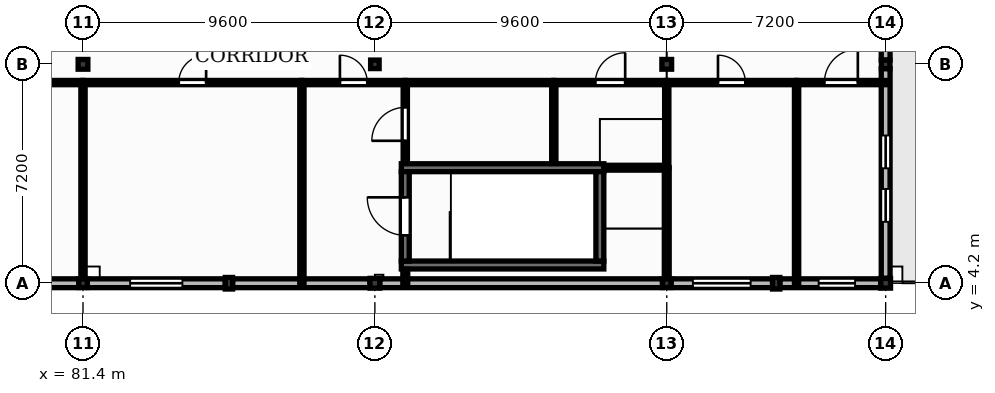
"""IFC4 building model, lengths in metres.
Left out: names, types, materials, properties, quantities, classifications, styles, units other than length and angle.
Written with IfcOpenShell. Run it as: python <this file> out.ifc"""

import sys

from ifc_helpers import new_model, si_unit, direction, frame, frame_2d, origin, origin_2d, place, context, subcontext, project, spatial, rectangle, extrude, element, fill, save


model = new_model("IFC4")
c1 = context("Model", 3, precision=1e-05, world=origin(), true_north=direction((0.0, 1.0)))
c2 = subcontext(c1, "Body", "Model", "MODEL_VIEW")
j1 = project(units=[si_unit("LENGTHUNIT", "METRE"), si_unit("PLANEANGLEUNIT", "RADIAN")], contexts=[c1])
p1 = place(None, origin())
s1 = spatial("IfcSite", under=j1, at=p1, CompositionType="ELEMENT")
p2 = place(p1, origin())
s2 = spatial("IfcBuilding", under=s1, at=p2, CompositionType="ELEMENT")
p3 = place(p2, frame((0.0, 0.0, 13.2)))
s3 = spatial("IfcBuildingStorey", under=s2, at=p3, CompositionType="ELEMENT", Elevation=13.2)
p4 = place(p3, frame((81.4, 4.2, 0.0), z_axis=(0.0, 0.0, 1.0), x_axis=(1.0, 0.0, 0.0)))
e1 = element("IfcColumn", 1, at=p4, inside=s3, PredefinedType="COLUMN", context=c2, shape_type="SweptSolid", body=[
    extrude(rectangle(XDim=0.28, YDim=0.28, at=origin_2d()), origin(), (0.0, 0.0, 1.0), 3.98),
])
p5 = place(p3, frame((81.4, 11.4, 0.0), z_axis=(0.0, 0.0, 1.0), x_axis=(1.0, 0.0, 0.0)))
e2 = element("IfcColumn", 2, at=p5, inside=s3, PredefinedType="COLUMN", context=c2, shape_type="SweptSolid", body=[
    extrude(rectangle(XDim=0.32, YDim=0.32, at=origin_2d()), origin(), (0.0, 0.0, 1.0), 6.045),
])
p6 = place(p3, frame((91.0, 4.2, 0.0), z_axis=(0.0, 0.0, 1.0), x_axis=(1.0, 0.0, 0.0)))
e3 = element("IfcColumn", 3, at=p6, inside=s3, PredefinedType="COLUMN", context=c2, shape_type="SweptSolid", body=[
    extrude(rectangle(XDim=0.32, YDim=0.32, at=origin_2d()), origin(), (0.0, 0.0, 1.0), 3.98),
])
p7 = place(p3, frame((91.0, 11.4, 0.0), z_axis=(0.0, 0.0, 1.0), x_axis=(1.0, 0.0, 0.0)))
e4 = element("IfcColumn", 4, at=p7, inside=s3, PredefinedType="COLUMN", context=c2, shape_type="SweptSolid", body=[
    extrude(rectangle(XDim=0.28, YDim=0.28, at=origin_2d()), origin(), (0.0, 0.0, 1.0), 6.045),
])
p8 = place(p3, frame((100.6, 4.2, 0.0), z_axis=(0.0, 0.0, 1.0), x_axis=(1.0, 0.0, 0.0)))
e5 = element("IfcColumn", 5, at=p8, inside=s3, PredefinedType="COLUMN", context=c2, shape_type="SweptSolid", body=[
    extrude(rectangle(XDim=0.28, YDim=0.28, at=origin_2d()), origin(), (0.0, 0.0, 1.0), 3.98),
])
p9 = place(p3, frame((100.6, 11.4, 0.0), z_axis=(0.0, 0.0, 1.0), x_axis=(1.0, 0.0, 0.0)))
e6 = element("IfcColumn", 6, at=p9, inside=s3, PredefinedType="COLUMN", context=c2, shape_type="SweptSolid", body=[
    extrude(rectangle(XDim=0.32, YDim=0.32, at=origin_2d()), origin(), (0.0, 0.0, 1.0), 6.045),
])
p10 = place(p3, frame((107.8, 4.2, 0.0), z_axis=(0.0, 0.0, 1.0), x_axis=(1.0, 0.0, 0.0)))
e7 = element("IfcColumn", 7, at=p10, inside=s3, PredefinedType="COLUMN", context=c2, shape_type="SweptSolid", body=[
    extrude(rectangle(XDim=0.32, YDim=0.32, at=origin_2d()), origin(), (0.0, 0.0, 1.0), 3.98),
])
p11 = place(p3, frame((107.8, 11.4, 0.0), z_axis=(0.0, 0.0, 1.0), x_axis=(1.0, 0.0, 0.0)))
e8 = element("IfcColumn", 8, at=p11, inside=s3, PredefinedType="COLUMN", context=c2, shape_type="SweptSolid", body=[
    extrude(rectangle(XDim=0.28, YDim=0.28, at=origin_2d()), origin(), (0.0, 0.0, 1.0), 6.045),
])
for number, where, z_axis, x_axis in (
    (9, (86.2, 4.2, 0.0), (0.0, 0.0, 1.0), (1.0, 0.0, 0.0)),
    (10, (104.2, 4.2, 0.0), (0.0, 0.0, 1.0), (1.0, 0.0, 0.0)),
):
    element("IfcColumn", number, at=place(p3, frame(where, z_axis=z_axis, x_axis=x_axis)), inside=s3, PredefinedType="PILASTER", context=c2, shape_type="SweptSolid", body=[
        extrude(rectangle(XDim=0.24, YDim=0.38, at=origin_2d()), origin(), (0.0, 0.0, 1.0), 4.0),
    ])
p12 = place(p3, frame((72.76, 4.2, 0.0), z_axis=(0.0, 0.0, 1.0), x_axis=(1.0, 0.0, 0.0)))
e11 = element("IfcWall", 11, at=p12, inside=s3, PredefinedType="SOLIDWALL", context=c2, shape_type="SweptSolid", body=[
    extrude(rectangle(XDim=8.5, YDim=0.29, at=frame_2d((4.25, 0.0))), origin(), (0.0, 0.0, 1.0), 4.0),
])
p13 = place(p12, frame((1.812, 0.0, 1.0)))
e12 = element("IfcOpeningElement", 12, at=p13, cuts=e11, PredefinedType="OPENING", context=c2, shape_type="SweptSolid", body=[
    extrude(rectangle(XDim=1.48, YDim=2.2, at=frame_2d((0.74, 1.1))), frame((0.0, 0.155, 0.0), z_axis=(0.0, -1.0, 0.0), x_axis=(1.0, 0.0, 0.0)), (0.0, 0.0, 1.0), 0.31),
])
p14 = place(p12, frame((5.882, 0.0, 1.0)))
e13 = element("IfcOpeningElement", 13, at=p14, cuts=e11, PredefinedType="OPENING", context=c2, shape_type="SweptSolid", body=[
    extrude(rectangle(XDim=1.6, YDim=2.2, at=frame_2d((0.8, 1.1))), frame((0.0, 0.155, 0.0), z_axis=(0.0, -1.0, 0.0), x_axis=(1.0, 0.0, 0.0)), (0.0, 0.0, 1.0), 0.31),
])
p15 = place(p3, frame((81.54, 4.2, 0.0), z_axis=(0.0, 0.0, 1.0), x_axis=(1.0, 0.0, 0.0)))
e14 = element("IfcWall", 14, at=p15, inside=s3, PredefinedType="SOLIDWALL", context=c2, shape_type="SweptSolid", body=[
    extrude(rectangle(XDim=4.54, YDim=0.29, at=frame_2d((2.27, 0.0))), origin(), (0.0, 0.0, 1.0), 4.0),
])
p16 = place(p15, frame((1.41, 0.0, 1.0)))
e15 = element("IfcOpeningElement", 15, at=p16, cuts=e14, PredefinedType="OPENING", context=c2, shape_type="SweptSolid", body=[
    extrude(rectangle(XDim=1.72, YDim=2.2, at=frame_2d((0.86, 1.1))), frame((0.0, 0.155, 0.0), z_axis=(0.0, -1.0, 0.0), x_axis=(1.0, 0.0, 0.0)), (0.0, 0.0, 1.0), 0.31),
])
p17 = place(p3, frame((86.32, 4.2, 0.0), z_axis=(0.0, 0.0, 1.0), x_axis=(1.0, 0.0, 0.0)))
e16 = element("IfcWall", 16, at=p17, inside=s3, PredefinedType="SOLIDWALL", context=c2, shape_type="SweptSolid", body=[
    extrude(rectangle(XDim=4.52, YDim=0.29, at=frame_2d((2.26, 0.0))), origin(), (0.0, 0.0, 1.0), 4.0),
])
p18 = place(p3, frame((91.16, 4.2, 0.0), z_axis=(0.0, 0.0, 1.0), x_axis=(1.0, 0.0, 0.0)))
e17 = element("IfcWall", 17, at=p18, inside=s3, PredefinedType="SOLIDWALL", context=c2, shape_type="SweptSolid", body=[
    extrude(rectangle(XDim=9.3, YDim=0.29, at=frame_2d((4.65, 0.0))), origin(), (0.0, 0.0, 1.0), 4.0),
])
p19 = place(p3, frame((100.74, 4.2, 0.0), z_axis=(0.0, 0.0, 1.0), x_axis=(1.0, 0.0, 0.0)))
e18 = element("IfcWall", 18, at=p19, inside=s3, PredefinedType="SOLIDWALL", context=c2, shape_type="SweptSolid", body=[
    extrude(rectangle(XDim=3.34, YDim=0.29, at=frame_2d((1.67, 0.0))), origin(), (0.0, 0.0, 1.0), 4.0),
])
p20 = place(p19, frame((0.72, 0.0, 1.0)))
e19 = element("IfcOpeningElement", 19, at=p20, cuts=e18, PredefinedType="OPENING", context=c2, shape_type="SweptSolid", body=[
    extrude(rectangle(XDim=1.9, YDim=1.95, at=frame_2d((0.95, 0.975))), frame((0.0, 0.155, 0.0), z_axis=(0.0, -1.0, 0.0), x_axis=(1.0, 0.0, 0.0)), (0.0, 0.0, 1.0), 0.31),
])
p21 = place(p3, frame((104.32, 4.2, 0.0), z_axis=(0.0, 0.0, 1.0), x_axis=(1.0, 0.0, 0.0)))
e20 = element("IfcWall", 20, at=p21, inside=s3, PredefinedType="SOLIDWALL", context=c2, shape_type="SweptSolid", body=[
    extrude(rectangle(XDim=3.32, YDim=0.29, at=frame_2d((1.66, 0.0))), origin(), (0.0, 0.0, 1.0), 4.0),
])
p22 = place(p21, frame((1.275, 0.0, 1.0)))
e21 = element("IfcOpeningElement", 21, at=p22, cuts=e20, PredefinedType="OPENING", context=c2, shape_type="SweptSolid", body=[
    extrude(rectangle(XDim=1.2, YDim=1.95, at=frame_2d((0.6, 0.975))), frame((0.0, 0.155, 0.0), z_axis=(0.0, -1.0, 0.0), x_axis=(1.0, 0.0, 0.0)), (0.0, 0.0, 1.0), 0.31),
])
p23 = place(p3, frame((107.8, 4.36, 0.0), z_axis=(0.0, 0.0, 1.0), x_axis=(0.0, 1.0, 0.0)))
e22 = element("IfcWall", 22, at=p23, inside=s3, PredefinedType="SOLIDWALL", context=c2, shape_type="SweptSolid", body=[
    extrude(rectangle(XDim=6.9, YDim=0.29, at=frame_2d((3.45, 0.0))), origin(), (0.0, 0.0, 1.0), 4.0),
])
p24 = place(p23, frame((1.86, 0.0, 1.0)))
e23 = element("IfcOpeningElement", 23, at=p24, cuts=e22, PredefinedType="OPENING", context=c2, shape_type="SweptSolid", body=[
    extrude(rectangle(XDim=1.08, YDim=1.95, at=frame_2d((0.54, 0.975))), frame((0.0, 0.155, 0.0), z_axis=(0.0, -1.0, 0.0), x_axis=(1.0, 0.0, 0.0)), (0.0, 0.0, 1.0), 0.31),
])
p25 = place(p23, frame((3.62, 0.0, 1.0)))
e24 = element("IfcOpeningElement", 24, at=p25, cuts=e22, PredefinedType="OPENING", context=c2, shape_type="SweptSolid", body=[
    extrude(rectangle(XDim=1.08, YDim=1.95, at=frame_2d((0.54, 0.975))), frame((0.0, 0.155, 0.0), z_axis=(0.0, -1.0, 0.0), x_axis=(1.0, 0.0, 0.0)), (0.0, 0.0, 1.0), 0.31),
])
p26 = place(p3, frame((107.8, 11.54, 0.0), z_axis=(0.0, 0.0, 1.0), x_axis=(0.0, 1.0, 0.0)))
e25 = element("IfcWall", 25, at=p26, inside=s3, PredefinedType="SOLIDWALL", context=c2, shape_type="SweptSolid", body=[
    extrude(rectangle(XDim=6.9, YDim=0.29, at=frame_2d((3.45, 0.0))), origin(), (0.0, 0.0, 1.0), 4.0),
])
p27 = place(p26, frame((2.9, 0.0, 0.0)))
e26 = element("IfcOpeningElement", 26, at=p27, cuts=e25, PredefinedType="OPENING", context=c2, shape_type="SweptSolid", body=[
    extrude(rectangle(XDim=1.1, YDim=2.25, at=frame_2d((0.55, 1.125))), frame((0.0, 0.155, 0.0), z_axis=(0.0, -1.0, 0.0), x_axis=(1.0, 0.0, 0.0)), (0.0, 0.0, 1.0), 0.31),
])
p28 = place(p26, frame((4.82, 0.0, 1.0)))
e27 = element("IfcOpeningElement", 27, at=p28, cuts=e25, PredefinedType="OPENING", context=c2, shape_type="SweptSolid", body=[
    extrude(rectangle(XDim=1.2, YDim=1.95, at=frame_2d((0.6, 0.975))), frame((0.0, 0.155, 0.0), z_axis=(0.0, -1.0, 0.0), x_axis=(1.0, 0.0, 0.0)), (0.0, 0.0, 1.0), 0.31),
])
for number, where, z_axis, x_axis in (
    (28, (91.87, 4.8, 0.0), (0.0, 0.0, 1.0), (1.0, 0.0, 0.0)),
    (29, (91.87, 8.0, 0.0), (0.0, 0.0, 1.0), (1.0, 0.0, 0.0)),
):
    element("IfcWall", number, at=place(p3, frame(where, z_axis=z_axis, x_axis=x_axis)), inside=s3, PredefinedType="SHEAR", context=c2, shape_type="SweptSolid", body=[
        extrude(rectangle(XDim=6.66, YDim=0.26, at=frame_2d((3.33, 0.0))), origin(), (0.0, 0.0, 1.0), 3.85),
    ])
p29 = place(p3, frame((92.0, 4.93, 0.0), z_axis=(0.0, 0.0, 1.0), x_axis=(0.0, 1.0, 0.0)))
e30 = element("IfcWall", 30, at=p29, inside=s3, PredefinedType="SHEAR", context=c2, shape_type="SweptSolid", body=[
    extrude(rectangle(XDim=2.94, YDim=0.26, at=frame_2d((1.47, 0.0))), origin(), (0.0, 0.0, 1.0), 3.85),
])
p30 = place(p29, frame((0.845, 0.0, 0.0)))
e31 = element("IfcOpeningElement", 31, at=p30, cuts=e30, PredefinedType="OPENING", context=c2, shape_type="SweptSolid", body=[
    extrude(rectangle(XDim=1.25, YDim=2.15, at=frame_2d((0.625, 1.075))), frame((0.0, 0.14, 0.0), z_axis=(0.0, -1.0, 0.0), x_axis=(1.0, 0.0, 0.0)), (0.0, 0.0, 1.0), 0.28),
])
p31 = place(p3, frame((98.4, 4.93, 0.0), z_axis=(0.0, 0.0, 1.0), x_axis=(0.0, 1.0, 0.0)))
e32 = element("IfcWall", 32, at=p31, inside=s3, PredefinedType="SHEAR", context=c2, shape_type="SweptSolid", body=[
    extrude(rectangle(XDim=2.94, YDim=0.26, at=frame_2d((1.47, 0.0))), origin(), (0.0, 0.0, 1.0), 3.85),
])
p32 = place(p3, frame((77.744, 10.8, 0.0), z_axis=(0.0, 0.0, 1.0), x_axis=(1.0, 0.0, 0.0)))
e33 = element("IfcWall", 33, at=p32, inside=s3, PredefinedType="PARTITIONING", context=c2, shape_type="SweptSolid", body=[
    extrude(rectangle(XDim=3.656, YDim=0.14, at=frame_2d((1.828, 0.0))), origin(), (0.0, 0.0, 1.0), 3.75),
])
p33 = place(p32, frame((1.378, 0.0, 0.0)))
e34 = element("IfcOpeningElement", 34, at=p33, cuts=e33, PredefinedType="OPENING", context=c2, shape_type="SweptSolid", body=[
    extrude(rectangle(XDim=0.9, YDim=2.1, at=frame_2d((0.45, 1.05))), frame((0.0, 0.08, 0.0), z_axis=(0.0, -1.0, 0.0), x_axis=(1.0, 0.0, 0.0)), (0.0, 0.0, 1.0), 0.16),
])
p34 = place(p3, frame((81.4, 4.34, 0.0), z_axis=(0.0, 0.0, 1.0), x_axis=(0.0, 1.0, 0.0)))
e35 = element("IfcWall", 35, at=p34, inside=s3, PredefinedType="PARTITIONING", context=c2, shape_type="SweptSolid", body=[
    extrude(rectangle(XDim=6.39, YDim=0.14, at=frame_2d((3.195, 0.0))), origin(), (0.0, 0.0, 1.0), 3.75),
])
p35 = place(p3, frame((81.4, 10.8, 0.0), z_axis=(0.0, 0.0, 1.0), x_axis=(1.0, 0.0, 0.0)))
e36 = element("IfcWall", 36, at=p35, inside=s3, PredefinedType="PARTITIONING", context=c2, shape_type="SweptSolid", body=[
    extrude(rectangle(XDim=7.2, YDim=0.14, at=frame_2d((3.6, 0.0))), origin(), (0.0, 0.0, 1.0), 3.75),
])
p36 = place(p35, frame((3.15, 0.0, 0.0)))
e37 = element("IfcOpeningElement", 37, at=p36, cuts=e36, PredefinedType="OPENING", context=c2, shape_type="SweptSolid", body=[
    extrude(rectangle(XDim=0.9, YDim=2.1, at=frame_2d((0.45, 1.05))), frame((0.0, 0.08, 0.0), z_axis=(0.0, -1.0, 0.0), x_axis=(1.0, 0.0, 0.0)), (0.0, 0.0, 1.0), 0.16),
])
p37 = place(p3, frame((88.6, 4.2, 0.0), z_axis=(0.0, 0.0, 1.0), x_axis=(0.0, 1.0, 0.0)))
e38 = element("IfcWall", 38, at=p37, inside=s3, PredefinedType="PARTITIONING", context=c2, shape_type="SweptSolid", body=[
    extrude(rectangle(XDim=6.53, YDim=0.14, at=frame_2d((3.265, 0.0))), origin(), (0.0, 0.0, 1.0), 3.75),
])
p38 = place(p3, frame((88.6, 10.8, 0.0), z_axis=(0.0, 0.0, 1.0), x_axis=(1.0, 0.0, 0.0)))
e39 = element("IfcWall", 39, at=p38, inside=s3, PredefinedType="PARTITIONING", context=c2, shape_type="SweptSolid", body=[
    extrude(rectangle(XDim=3.4, YDim=0.14, at=frame_2d((1.7, 0.0))), origin(), (0.0, 0.0, 1.0), 3.75),
])
p39 = place(p38, frame((1.25, 0.0, 0.0)))
e40 = element("IfcOpeningElement", 40, at=p39, cuts=e39, PredefinedType="OPENING", context=c2, shape_type="SweptSolid", body=[
    extrude(rectangle(XDim=0.9, YDim=2.1, at=frame_2d((0.45, 1.05))), frame((0.0, 0.08, 0.0), z_axis=(0.0, -1.0, 0.0), x_axis=(1.0, 0.0, 0.0)), (0.0, 0.0, 1.0), 0.16),
])
p40 = place(p3, frame((92.0, 8.14, 0.0), z_axis=(0.0, 0.0, 1.0), x_axis=(0.0, 1.0, 0.0)))
e41 = element("IfcWall", 41, at=p40, inside=s3, PredefinedType="PARTITIONING", context=c2, shape_type="SweptSolid", body=[
    extrude(rectangle(XDim=2.59, YDim=0.14, at=frame_2d((1.295, 0.0))), origin(), (0.0, 0.0, 1.0), 3.75),
])
p41 = place(p40, frame((0.745, 0.0, 0.0)))
e42 = element("IfcOpeningElement", 42, at=p41, cuts=e41, PredefinedType="OPENING", context=c2, shape_type="SweptSolid", body=[
    extrude(rectangle(XDim=1.1, YDim=2.1, at=frame_2d((0.55, 1.05))), frame((0.0, 0.08, 0.0), z_axis=(0.0, -1.0, 0.0), x_axis=(1.0, 0.0, 0.0)), (0.0, 0.0, 1.0), 0.16),
])
p42 = place(p3, frame((92.0, 10.8, 0.0), z_axis=(0.0, 0.0, 1.0), x_axis=(1.0, 0.0, 0.0)))
e43 = element("IfcWall", 43, at=p42, inside=s3, PredefinedType="PARTITIONING", context=c2, shape_type="SweptSolid", body=[
    extrude(rectangle(XDim=4.885, YDim=0.14, at=frame_2d((2.442, 0.0))), origin(), (0.0, 0.0, 1.0), 3.75),
])
p43 = place(p3, frame((96.885, 8.14, 0.0), z_axis=(0.0, 0.0, 1.0), x_axis=(0.0, 1.0, 0.0)))
e44 = element("IfcWall", 44, at=p43, inside=s3, PredefinedType="PARTITIONING", context=c2, shape_type="SweptSolid", body=[
    extrude(rectangle(XDim=2.59, YDim=0.14, at=frame_2d((1.295, 0.0))), origin(), (0.0, 0.0, 1.0), 3.75),
])
p44 = place(p3, frame((96.885, 10.8, 0.0), z_axis=(0.0, 0.0, 1.0), x_axis=(1.0, 0.0, 0.0)))
e45 = element("IfcWall", 45, at=p44, inside=s3, PredefinedType="PARTITIONING", context=c2, shape_type="SweptSolid", body=[
    extrude(rectangle(XDim=3.715, YDim=0.14, at=frame_2d((1.857, 0.0))), origin(), (0.0, 0.0, 1.0), 3.75),
])
p45 = place(p44, frame((1.367, 0.0, 0.0)))
e46 = element("IfcOpeningElement", 46, at=p45, cuts=e45, PredefinedType="OPENING", context=c2, shape_type="SweptSolid", body=[
    extrude(rectangle(XDim=0.98, YDim=2.15, at=frame_2d((0.49, 1.075))), frame((0.0, 0.08, 0.0), z_axis=(0.0, -1.0, 0.0), x_axis=(1.0, 0.0, 0.0)), (0.0, 0.0, 1.0), 0.16),
])
p46 = place(p3, frame((100.6, 8.0, 0.0), z_axis=(0.0, 0.0, 1.0), x_axis=(0.0, 1.0, 0.0)))
e47 = element("IfcWall", 47, at=p46, inside=s3, PredefinedType="PARTITIONING", context=c2, shape_type="SweptSolid", body=[
    extrude(rectangle(XDim=2.73, YDim=0.14, at=frame_2d((1.365, 0.0))), origin(), (0.0, 0.0, 1.0), 3.75),
])
p47 = place(p3, frame((100.6, 10.8, 0.0), z_axis=(0.0, 0.0, 1.0), x_axis=(1.0, 0.0, 0.0)))
e48 = element("IfcWall", 48, at=p47, inside=s3, PredefinedType="PARTITIONING", context=c2, shape_type="SweptSolid", body=[
    extrude(rectangle(XDim=4.27, YDim=0.14, at=frame_2d((2.135, 0.0))), origin(), (0.0, 0.0, 1.0), 3.75),
])
p48 = place(p47, frame((1.685, 0.0, 0.0)))
e49 = element("IfcOpeningElement", 49, at=p48, cuts=e48, PredefinedType="OPENING", context=c2, shape_type="SweptSolid", body=[
    extrude(rectangle(XDim=0.9, YDim=2.1, at=frame_2d((0.45, 1.05))), frame((0.0, 0.08, 0.0), z_axis=(0.0, -1.0, 0.0), x_axis=(1.0, 0.0, 0.0)), (0.0, 0.0, 1.0), 0.16),
])
p49 = place(p3, frame((104.87, 4.2, 0.0), z_axis=(0.0, 0.0, 1.0), x_axis=(0.0, 1.0, 0.0)))
e50 = element("IfcWall", 50, at=p49, inside=s3, PredefinedType="PARTITIONING", context=c2, shape_type="SweptSolid", body=[
    extrude(rectangle(XDim=6.53, YDim=0.14, at=frame_2d((3.265, 0.0))), origin(), (0.0, 0.0, 1.0), 3.75),
])
p50 = place(p3, frame((104.87, 10.8, 0.0), z_axis=(0.0, 0.0, 1.0), x_axis=(1.0, 0.0, 0.0)))
e51 = element("IfcWall", 51, at=p50, inside=s3, PredefinedType="PARTITIONING", context=c2, shape_type="SweptSolid", body=[
    extrude(rectangle(XDim=2.93, YDim=0.14, at=frame_2d((1.465, 0.0))), origin(), (0.0, 0.0, 1.0), 3.75),
])
p51 = place(p50, frame((0.915, 0.0, 0.0)))
e52 = element("IfcOpeningElement", 52, at=p51, cuts=e51, PredefinedType="OPENING", context=c2, shape_type="SweptSolid", body=[
    extrude(rectangle(XDim=1.1, YDim=2.1, at=frame_2d((0.55, 1.05))), frame((0.0, 0.08, 0.0), z_axis=(0.0, -1.0, 0.0), x_axis=(1.0, 0.0, 0.0)), (0.0, 0.0, 1.0), 0.16),
])
p52 = place(p3, frame((92.0, 4.2, 0.0), z_axis=(0.0, 0.0, 1.0), x_axis=(0.0, 1.0, 0.0)))
e53 = element("IfcWall", 53, at=p52, inside=s3, PredefinedType="PARTITIONING", context=c2, shape_type="SweptSolid", body=[
    extrude(rectangle(XDim=0.46, YDim=0.16, at=frame_2d((0.23, 0.0))), origin(), (0.0, 0.0, 1.0), 3.75),
])
p53 = place(p3, frame((98.54, 8.0, 0.0), z_axis=(0.0, 0.0, 1.0), x_axis=(1.0, 0.0, 0.0)))
e54 = element("IfcWall", 54, at=p53, inside=s3, PredefinedType="PARTITIONING", context=c2, shape_type="SweptSolid", body=[
    extrude(rectangle(XDim=2.06, YDim=0.16, at=frame_2d((1.03, 0.0))), origin(), (0.0, 0.0, 1.0), 3.75),
])
p54 = place(p3, frame((100.6, 4.34, 0.0), z_axis=(0.0, 0.0, 1.0), x_axis=(0.0, 1.0, 0.0)))
e55 = element("IfcWall", 55, at=p54, inside=s3, PredefinedType="PARTITIONING", context=c2, shape_type="SweptSolid", body=[
    extrude(rectangle(XDim=3.66, YDim=0.16, at=frame_2d((1.83, 0.0))), origin(), (0.0, 0.0, 1.0), 3.75),
])
p55 = place(p16, origin())
e56 = element("IfcWindow", 56, at=p55, inside=s3, PartitioningType="DOUBLE_PANEL_VERTICAL", PredefinedType="WINDOW", context=c2, shape_type="SweptSolid", body=[
    extrude(rectangle(XDim=1.72, YDim=2.2, at=frame_2d((0.86, 1.1))), frame((0.0, 0.03, 0.0), z_axis=(0.0, -1.0, 0.0), x_axis=(1.0, 0.0, 0.0)), (0.0, 0.0, 1.0), 0.06),
])
fill(e15, e56)
p56 = place(p20, origin())
e57 = element("IfcWindow", 57, at=p56, inside=s3, PartitioningType="DOUBLE_PANEL_VERTICAL", PredefinedType="WINDOW", context=c2, shape_type="SweptSolid", body=[
    extrude(rectangle(XDim=1.9, YDim=1.95, at=frame_2d((0.95, 0.975))), frame((0.0, 0.03, 0.0), z_axis=(0.0, -1.0, 0.0), x_axis=(1.0, 0.0, 0.0)), (0.0, 0.0, 1.0), 0.06),
])
fill(e19, e57)
p57 = place(p22, origin())
e58 = element("IfcWindow", 58, at=p57, inside=s3, PartitioningType="SINGLE_PANEL", PredefinedType="WINDOW", context=c2, shape_type="SweptSolid", body=[
    extrude(rectangle(XDim=1.2, YDim=1.95, at=frame_2d((0.6, 0.975))), frame((0.0, 0.03, 0.0), z_axis=(0.0, -1.0, 0.0), x_axis=(1.0, 0.0, 0.0)), (0.0, 0.0, 1.0), 0.06),
])
fill(e21, e58)
p58 = place(p24, origin())
e59 = element("IfcWindow", 59, at=p58, inside=s3, PartitioningType="SINGLE_PANEL", PredefinedType="WINDOW", context=c2, shape_type="SweptSolid", body=[
    extrude(rectangle(XDim=1.08, YDim=1.95, at=frame_2d((0.54, 0.975))), frame((0.0, 0.03, 0.0), z_axis=(0.0, -1.0, 0.0), x_axis=(1.0, 0.0, 0.0)), (0.0, 0.0, 1.0), 0.06),
])
fill(e23, e59)
p59 = place(p25, origin())
e60 = element("IfcWindow", 60, at=p59, inside=s3, PartitioningType="SINGLE_PANEL", PredefinedType="WINDOW", context=c2, shape_type="SweptSolid", body=[
    extrude(rectangle(XDim=1.08, YDim=1.95, at=frame_2d((0.54, 0.975))), frame((0.0, 0.03, 0.0), z_axis=(0.0, -1.0, 0.0), x_axis=(1.0, 0.0, 0.0)), (0.0, 0.0, 1.0), 0.06),
])
fill(e24, e60)
p60 = place(p30, origin())
e61 = element("IfcDoor", 61, at=p60, inside=s3, OperationType="SINGLE_SWING_RIGHT", PredefinedType="DOOR", context=c2, shape_type="SweptSolid", body=[
    extrude(rectangle(XDim=1.25, YDim=2.15, at=frame_2d((0.625, 1.075))), frame((0.0, 0.025, 0.0), z_axis=(0.0, -1.0, 0.0), x_axis=(1.0, 0.0, 0.0)), (0.0, 0.0, 1.0), 0.05),
])
fill(e31, e61)
p61 = place(p39, origin())
e62 = element("IfcDoor", 62, at=p61, inside=s3, OperationType="SINGLE_SWING_LEFT", PredefinedType="DOOR", context=c2, shape_type="SweptSolid", body=[
    extrude(rectangle(XDim=0.9, YDim=2.1, at=frame_2d((0.45, 1.05))), frame((0.0, 0.025, 0.0), z_axis=(0.0, -1.0, 0.0), x_axis=(1.0, 0.0, 0.0)), (0.0, 0.0, 1.0), 0.05),
])
fill(e40, e62)
p62 = place(p36, origin())
e63 = element("IfcDoor", 63, at=p62, inside=s3, OperationType="SINGLE_SWING_RIGHT", PredefinedType="DOOR", context=c2, shape_type="SweptSolid", body=[
    extrude(rectangle(XDim=0.9, YDim=2.1, at=frame_2d((0.45, 1.05))), frame((0.0, 0.025, 0.0), z_axis=(0.0, -1.0, 0.0), x_axis=(1.0, 0.0, 0.0)), (0.0, 0.0, 1.0), 0.05),
])
fill(e37, e63)
p63 = place(p41, origin())
e64 = element("IfcDoor", 64, at=p63, inside=s3, OperationType="SINGLE_SWING_LEFT", PredefinedType="DOOR", context=c2, shape_type="SweptSolid", body=[
    extrude(rectangle(XDim=1.1, YDim=2.1, at=frame_2d((0.55, 1.05))), frame((0.0, 0.025, 0.0), z_axis=(0.0, -1.0, 0.0), x_axis=(1.0, 0.0, 0.0)), (0.0, 0.0, 1.0), 0.05),
])
fill(e42, e64)
p64 = place(p45, origin())
e65 = element("IfcDoor", 65, at=p64, inside=s3, OperationType="SINGLE_SWING_RIGHT", PredefinedType="DOOR", context=c2, shape_type="SweptSolid", body=[
    extrude(rectangle(XDim=0.98, YDim=2.15, at=frame_2d((0.49, 1.075))), frame((0.0, 0.025, 0.0), z_axis=(0.0, -1.0, 0.0), x_axis=(1.0, 0.0, 0.0)), (0.0, 0.0, 1.0), 0.05),
])
fill(e46, e65)
p65 = place(p48, origin())
e66 = element("IfcDoor", 66, at=p65, inside=s3, OperationType="SINGLE_SWING_LEFT", PredefinedType="DOOR", context=c2, shape_type="SweptSolid", body=[
    extrude(rectangle(XDim=0.9, YDim=2.1, at=frame_2d((0.45, 1.05))), frame((0.0, 0.025, 0.0), z_axis=(0.0, -1.0, 0.0), x_axis=(1.0, 0.0, 0.0)), (0.0, 0.0, 1.0), 0.05),
])
fill(e49, e66)
p66 = place(p51, origin())
e67 = element("IfcDoor", 67, at=p66, inside=s3, OperationType="SINGLE_SWING_RIGHT", PredefinedType="DOOR", context=c2, shape_type="SweptSolid", body=[
    extrude(rectangle(XDim=1.1, YDim=2.1, at=frame_2d((0.55, 1.05))), frame((0.0, 0.025, 0.0), z_axis=(0.0, -1.0, 0.0), x_axis=(1.0, 0.0, 0.0)), (0.0, 0.0, 1.0), 0.05),
])
fill(e52, e67)
save(model, sys.argv[1])
